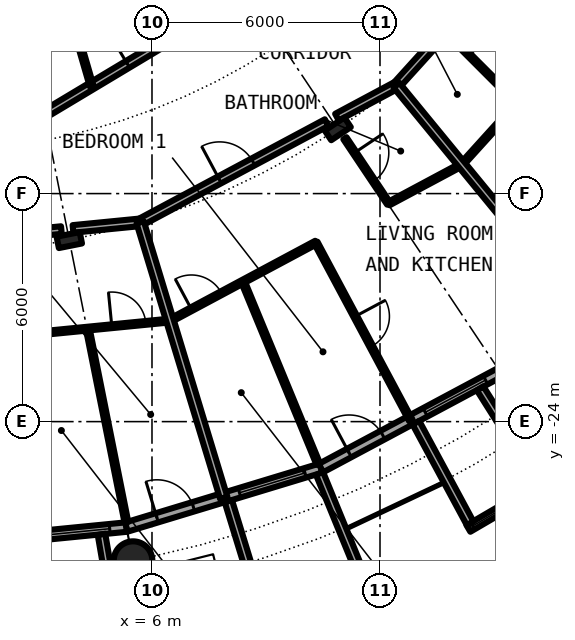
"""IFC4 building model, lengths in metres.
Left out: names, types, materials, properties, quantities, classifications, styles, units other than length and angle.
Written with IfcOpenShell. Run it as: python <this file> out.ifc"""

import sys

from ifc_helpers import new_model, si_unit, direction, frame, frame_2d, origin, origin_2d, place, context, subcontext, project, spatial, rectangle, circle, hollow_circle, i_section, extrude, element, fill, save


model = new_model("IFC4")
c1 = context("Model", 3, precision=1e-05, world=origin(), true_north=direction((0.0, 1.0)))
c2 = subcontext(c1, "Body", "Model", "MODEL_VIEW")
j1 = project(units=[si_unit("LENGTHUNIT", "METRE"), si_unit("PLANEANGLEUNIT", "RADIAN")], contexts=[c1])
p1 = place(None, origin())
s1 = spatial("IfcSite", under=j1, at=p1, CompositionType="ELEMENT")
p2 = place(p1, origin())
s2 = spatial("IfcBuilding", under=s1, at=p2, CompositionType="ELEMENT")
p3 = place(p2, frame((0.0, 0.0, 50.25)))
s3 = spatial("IfcBuildingStorey", under=s2, at=p3, CompositionType="ELEMENT", Elevation=50.25)
p4 = place(p3, frame((5.501, -27.658, 0.0), z_axis=(0.0, 0.0, 1.0), x_axis=(1.0, 0.0, 0.0)))
e1 = element("IfcColumn", 1, at=p4, inside=s3, PredefinedType="COLUMN", context=c2, shape_type="SweptSolid", body=[
    extrude(hollow_circle(Radius=0.508, WallThickness=0.05, at=origin_2d()), origin(), (0.0, 0.0, 1.0), 3.05),
])
for number, where, z_axis, x_axis in (
    (2, (3.824, -19.223, 0.0), (0.0, 0.0, 1.0), (0.195, -0.981, 0.0)),
    (3, (10.889, -16.297, 0.0), (0.0, 0.0, 1.0), (0.556, -0.831, 0.0)),
):
    element("IfcColumn", number, at=place(p3, frame(where, z_axis=z_axis, x_axis=x_axis)), inside=s3, PredefinedType="COLUMN", context=c2, shape_type="SweptSolid", body=[
        extrude(i_section(OverallWidth=0.305, OverallDepth=0.62, WebThickness=0.021, FlangeThickness=0.04, FilletRadius=0.027, at=origin_2d()), origin(), (0.0, 0.0, 1.0), 3.05),
    ])
p5 = place(p3, frame((0.0, -27.3, 0.0), z_axis=(0.0, 0.0, 1.0), x_axis=(0.995173996315, 0.098126026407, 0.0)))
e4 = element("IfcWall", 4, at=p5, inside=s3, PredefinedType="SOLIDWALL", context=c2, shape_type="SweptSolid", body=[
    extrude(rectangle(XDim=5.352, YDim=0.25, at=frame_2d((2.676, 0.0))), origin(), (0.0, 0.0, 1.0), 2.7),
])
p6 = place(p5, frame((0.841, 0.0, 0.0)))
e5 = element("IfcOpeningElement", 5, at=p6, cuts=e4, PredefinedType="OPENING", context=c2, shape_type="SweptSolid", body=[
    extrude(rectangle(XDim=1.0, YDim=2.2, at=frame_2d((0.5, 1.1))), frame((0.0, 0.135, 0.0), z_axis=(0.0, -1.0, 0.0), x_axis=(1.0, 0.0, 0.0)), (0.0, 0.0, 1.0), 0.27),
])
p7 = place(p5, frame((3.111, 0.0, 0.3)))
e6 = element("IfcOpeningElement", 6, at=p7, cuts=e4, PredefinedType="OPENING", context=c2, shape_type="SweptSolid", body=[
    extrude(rectangle(XDim=1.8, YDim=2.1, at=frame_2d((0.9, 1.05))), frame((0.0, 0.135, 0.0), z_axis=(0.0, -1.0, 0.0), x_axis=(1.0, 0.0, 0.0)), (0.0, 0.0, 1.0), 0.27),
])
p8 = place(p3, frame((4.671, -26.966, -0.03), z_axis=(0.0, 0.0, 1.0), x_axis=(0.170539878907, -0.985350774954, 0.0)))
e7 = element("IfcWall", 7, at=p8, inside=s3, PredefinedType="SOLIDWALL", context=c2, shape_type="SweptSolid", body=[
    extrude(rectangle(XDim=2.932, YDim=0.2, at=frame_2d((1.466, 0.0))), origin(), (0.0, 0.0, 1.0), 2.73),
])
p9 = place(p3, frame((5.326, -26.775, 0.0), z_axis=(0.0, 0.0, 1.0), x_axis=(0.956965678721, 0.290201119486, 0.0)))
e8 = element("IfcWall", 8, at=p9, inside=s3, PredefinedType="SOLIDWALL", context=c2, shape_type="SweptSolid", body=[
    extrude(rectangle(XDim=5.351, YDim=0.25, at=frame_2d((2.676, 0.0))), origin(), (0.0, 0.0, 1.0), 2.7),
])
p10 = place(p9, frame((0.841, 0.0, 0.0)))
e9 = element("IfcOpeningElement", 9, at=p10, cuts=e8, PredefinedType="OPENING", context=c2, shape_type="SweptSolid", body=[
    extrude(rectangle(XDim=1.0, YDim=2.2, at=frame_2d((0.5, 1.1))), frame((0.0, 0.135, 0.0), z_axis=(0.0, -1.0, 0.0), x_axis=(1.0, 0.0, 0.0)), (0.0, 0.0, 1.0), 0.27),
])
p11 = place(p9, frame((3.111, 0.0, 0.3)))
e10 = element("IfcOpeningElement", 10, at=p11, cuts=e8, PredefinedType="OPENING", context=c2, shape_type="SweptSolid", body=[
    extrude(rectangle(XDim=1.8, YDim=2.1, at=frame_2d((0.9, 1.05))), frame((0.0, 0.135, 0.0), z_axis=(0.0, -1.0, 0.0), x_axis=(1.0, 0.0, 0.0)), (0.0, 0.0, 1.0), 0.27),
])
p12 = place(p3, frame((8.009, -26.092, -0.03), z_axis=(0.0, 0.0, 1.0), x_axis=(0.293406695073, -0.955987715029, 0.0)))
e11 = element("IfcWall", 11, at=p12, inside=s3, PredefinedType="SOLIDWALL", context=c2, shape_type="SweptSolid", body=[
    extrude(rectangle(XDim=3.006, YDim=0.2, at=frame_2d((1.503, 0.0))), origin(), (0.0, 0.0, 1.0), 2.73),
])
p13 = place(p3, frame((10.409, -25.364, -0.03), z_axis=(0.0, 0.0, 1.0), x_axis=(0.379509886562, -0.925187681501, 0.0)))
e12 = element("IfcWall", 12, at=p13, inside=s3, PredefinedType="SOLIDWALL", context=c2, shape_type="SweptSolid", body=[
    extrude(rectangle(XDim=2.883, YDim=0.2, at=frame_2d((1.441, 0.0))), origin(), (0.0, 0.0, 1.0), 2.73),
])
p14 = place(p3, frame((10.447, -25.222, 0.0), z_axis=(0.0, 0.0, 1.0), x_axis=(0.881915646801, 0.471407246368, 0.0)))
e13 = element("IfcWall", 13, at=p14, inside=s3, PredefinedType="SOLIDWALL", context=c2, shape_type="SweptSolid", body=[
    extrude(rectangle(XDim=5.352, YDim=0.25, at=frame_2d((2.676, 0.0))), origin(), (0.0, 0.0, 1.0), 2.7),
])
p15 = place(p14, frame((0.841, 0.0, 0.0)))
e14 = element("IfcOpeningElement", 14, at=p15, cuts=e13, PredefinedType="OPENING", context=c2, shape_type="SweptSolid", body=[
    extrude(rectangle(XDim=1.0, YDim=2.2, at=frame_2d((0.5, 1.1))), frame((0.0, 0.135, 0.0), z_axis=(0.0, -1.0, 0.0), x_axis=(1.0, 0.0, 0.0)), (0.0, 0.0, 1.0), 0.27),
])
p16 = place(p14, frame((3.111, 0.0, 0.3)))
e15 = element("IfcOpeningElement", 15, at=p16, cuts=e13, PredefinedType="OPENING", context=c2, shape_type="SweptSolid", body=[
    extrude(rectangle(XDim=1.8, YDim=2.1, at=frame_2d((0.9, 1.05))), frame((0.0, 0.135, 0.0), z_axis=(0.0, -1.0, 0.0), x_axis=(1.0, 0.0, 0.0)), (0.0, 0.0, 1.0), 0.27),
])
p17 = place(p3, frame((14.327, -26.812, -0.03), z_axis=(0.0, 0.0, 1.0), x_axis=(0.863346521872, 0.504611517081, 0.0)))
e16 = element("IfcWall", 16, at=p17, inside=s3, PredefinedType="SOLIDWALL", context=c2, shape_type="SweptSolid", body=[
    extrude(rectangle(XDim=2.336, YDim=0.2, at=frame_2d((1.168, 0.0))), origin(), (0.0, 0.0, 1.0), 2.73),
])
p18 = place(p17, frame((0.128, 0.0, 0.33)))
e17 = element("IfcOpeningElement", 17, at=p18, cuts=e16, PredefinedType="OPENING", context=c2, shape_type="SweptSolid", body=[
    extrude(circle(Radius=1.04, at=frame_2d((1.04, 1.04))), frame((0.0, 0.11, 0.0), z_axis=(0.0, -1.0, 0.0), x_axis=(1.0, 0.0, 0.0)), (0.0, 0.0, 1.0), 0.22),
])
p19 = place(p3, frame((12.945, -24.029, -0.03), z_axis=(0.0, 0.0, 1.0), x_axis=(0.474424310775, -0.88029629861, 0.0)))
e18 = element("IfcWall", 18, at=p19, inside=s3, PredefinedType="SOLIDWALL", context=c2, shape_type="SweptSolid", body=[
    extrude(rectangle(XDim=3.006, YDim=0.2, at=frame_2d((1.503, 0.0))), origin(), (0.0, 0.0, 1.0), 2.73),
])
p20 = place(p3, frame((14.635, -23.126, -0.03), z_axis=(0.0, 0.0, 1.0), x_axis=(0.534437802731, -0.845207805816, 0.0)))
e19 = element("IfcWall", 19, at=p20, inside=s3, PredefinedType="SOLIDWALL", context=c2, shape_type="SweptSolid", body=[
    extrude(rectangle(XDim=2.932, YDim=0.2, at=frame_2d((1.466, 0.0))), origin(), (0.0, 0.0, 1.0), 2.73),
])
p21 = place(p3, frame((14.153, -17.234, 0.0), z_axis=(0.0, 0.0, 1.0), x_axis=(0.671144831591, 0.741326254107, 0.0)))
e20 = element("IfcWall", 20, at=p21, inside=s3, PredefinedType="PARTITIONING", context=c2, shape_type="SweptSolid", body=[
    extrude(rectangle(XDim=2.181, YDim=0.1, at=frame_2d((1.091, 0.0))), origin(), (0.0, 0.0, 1.0), 2.7),
])
p22 = place(p3, frame((2.144, -21.766, 0.0), z_axis=(0.0, 0.0, 1.0), x_axis=(0.995192120883, 0.097942036599, 0.0)))
e21 = element("IfcWall", 21, at=p22, inside=s3, PredefinedType="PARTITIONING", context=c2, shape_type="SweptSolid", body=[
    extrude(rectangle(XDim=4.35, YDim=0.1, at=frame_2d((2.175, 0.0))), origin(), (0.0, 0.0, 1.0), 2.7),
])
p23 = place(p22, frame((2.812, 0.0, 0.0)))
e22 = element("IfcOpeningElement", 22, at=p23, cuts=e21, PredefinedType="OPENING", context=c2, shape_type="SweptSolid", body=[
    extrude(rectangle(XDim=0.9, YDim=2.3, at=frame_2d((0.45, 1.15))), frame((0.0, 0.06, 0.0), z_axis=(0.0, -1.0, 0.0), x_axis=(1.0, 0.0, 0.0)), (0.0, 0.0, 1.0), 0.12),
])
p24 = place(p3, frame((6.478, -21.34, 0.0), z_axis=(0.0, 0.0, 1.0), x_axis=(0.881765663848, 0.471687729392, 0.0)))
e23 = element("IfcWall", 23, at=p24, inside=s3, PredefinedType="PARTITIONING", context=c2, shape_type="SweptSolid", body=[
    extrude(rectangle(XDim=4.355, YDim=0.1, at=frame_2d((2.177, 0.0))), origin(), (0.0, 0.0, 1.0), 2.7),
])
p25 = place(p24, frame((0.633, 0.0, 0.0)))
e24 = element("IfcOpeningElement", 24, at=p25, cuts=e23, PredefinedType="OPENING", context=c2, shape_type="SweptSolid", body=[
    extrude(rectangle(XDim=0.9, YDim=2.3, at=frame_2d((0.45, 1.15))), frame((0.0, 0.06, 0.0), z_axis=(0.0, -1.0, 0.0), x_axis=(1.0, 0.0, 0.0)), (0.0, 0.0, 1.0), 0.12),
])
p26 = place(p3, frame((12.229, -18.264, 0.0), z_axis=(0.0, 0.0, 1.0), x_axis=(0.881786813167, 0.471648191055, 0.0)))
e25 = element("IfcWall", 25, at=p26, inside=s3, PredefinedType="PARTITIONING", context=c2, shape_type="SweptSolid", body=[
    extrude(rectangle(XDim=2.175, YDim=0.1, at=frame_2d((1.087, 0.0))), origin(), (0.0, 0.0, 1.0), 2.7),
])
p27 = place(p3, frame((12.434, -15.151, 0.0), z_axis=(0.0, 0.0, 1.0), x_axis=(0.671514934772, 0.740991020444, 0.0)))
e26 = element("IfcWall", 26, at=p27, inside=s3, PredefinedType="PARTITIONING", context=c2, shape_type="SweptSolid", body=[
    extrude(rectangle(XDim=5.598, YDim=0.2, at=frame_2d((2.799, 0.0))), origin(), (0.0, 0.0, 1.0), 2.38),
])
p28 = place(p27, frame((3.305, 0.0, 0.0)))
e27 = element("IfcOpeningElement", 27, at=p28, cuts=e26, PredefinedType="OPENING", context=c2, shape_type="SweptSolid", body=[
    extrude(rectangle(XDim=1.0, YDim=2.3, at=frame_2d((0.5, 1.15))), frame((0.0, 0.11, 0.0), z_axis=(0.0, -1.0, 0.0), x_axis=(1.0, 0.0, 0.0)), (0.0, 0.0, 1.0), 0.22),
])
p29 = place(p3, frame((-1.927, -19.506, 0.0), z_axis=(0.0, 0.0, 1.0), x_axis=(0.995181086618, 0.098054091383, 0.0)))
e28 = element("IfcWall", 28, at=p29, inside=s3, PredefinedType="PARTITIONING", context=c2, shape_type="SweptSolid", body=[
    extrude(rectangle(XDim=5.57, YDim=0.2, at=frame_2d((2.785, 0.0))), origin(), (0.0, 0.0, 1.0), 2.38),
])
p30 = place(p29, frame((4.168, 0.0, 0.0)))
e29 = element("IfcOpeningElement", 29, at=p30, cuts=e28, PredefinedType="OPENING", context=c2, shape_type="SweptSolid", body=[
    extrude(rectangle(XDim=1.0, YDim=2.3, at=frame_2d((0.5, 1.15))), frame((0.0, 0.11, 0.0), z_axis=(0.0, -1.0, 0.0), x_axis=(1.0, 0.0, 0.0)), (0.0, 0.0, 1.0), 0.22),
])
p31 = place(p3, frame((3.921, -18.93, 0.0), z_axis=(0.0, 0.0, 1.0), x_axis=(0.995207057161, 0.097790149696, 0.0)))
e30 = element("IfcWall", 30, at=p31, inside=s3, PredefinedType="PARTITIONING", context=c2, shape_type="SweptSolid", body=[
    extrude(rectangle(XDim=1.778, YDim=0.2, at=frame_2d((0.889, 0.0))), origin(), (0.0, 0.0, 1.0), 2.38),
])
p32 = place(p3, frame((5.69, -18.756, 0.0), z_axis=(0.0, 0.0, 1.0), x_axis=(0.881866548297, 0.471499089072, 0.0)))
e31 = element("IfcWall", 31, at=p32, inside=s3, PredefinedType="PARTITIONING", context=c2, shape_type="SweptSolid", body=[
    extrude(rectangle(XDim=5.563, YDim=0.2, at=frame_2d((2.782, 0.0))), origin(), (0.0, 0.0, 1.0), 2.38),
])
p33 = place(p32, frame((2.368, 0.0, 0.0)))
e32 = element("IfcOpeningElement", 32, at=p33, cuts=e31, PredefinedType="OPENING", context=c2, shape_type="SweptSolid", body=[
    extrude(rectangle(XDim=1.0, YDim=2.3, at=frame_2d((0.5, 1.15))), frame((0.0, 0.11, 0.0), z_axis=(0.0, -1.0, 0.0), x_axis=(1.0, 0.0, 0.0)), (0.0, 0.0, 1.0), 0.22),
])
p34 = place(p3, frame((10.867, -15.989, 0.0), z_axis=(0.0, 0.0, 1.0), x_axis=(0.881596178172, 0.472004426496, 0.0)))
e33 = element("IfcWall", 33, at=p34, inside=s3, PredefinedType="PARTITIONING", context=c2, shape_type="SweptSolid", body=[
    extrude(rectangle(XDim=1.78, YDim=0.2, at=frame_2d((0.89, 0.0))), origin(), (0.0, 0.0, 1.0), 2.38),
])
p35 = place(p3, frame((1.656, -16.819, 0.0), z_axis=(0.0, 0.0, 1.0), x_axis=(0.857773470126, 0.514027892189, 0.0)))
e34 = element("IfcWall", 34, at=p35, inside=s3, PredefinedType="PARTITIONING", context=c2, shape_type="SweptSolid", body=[
    extrude(rectangle(XDim=14.429, YDim=0.2, at=frame_2d((7.215, 0.0))), origin(), (0.0, 0.0, 1.0), 2.7),
])
p36 = place(p35, frame((4.318, 0.0, 0.0)))
e35 = element("IfcOpeningElement", 35, at=p36, cuts=e34, PredefinedType="OPENING", context=c2, shape_type="SweptSolid", body=[
    extrude(rectangle(XDim=1.0, YDim=2.3, at=frame_2d((0.5, 1.15))), frame((0.0, 0.11, 0.0), z_axis=(0.0, -1.0, 0.0), x_axis=(1.0, 0.0, 0.0)), (0.0, 0.0, 1.0), 0.22),
])
p37 = place(p3, frame((3.706, -12.744, 0.0), z_axis=(0.0, 0.0, 1.0), x_axis=(0.279201466266, -0.960232545395, 0.0)))
e36 = element("IfcWall", 36, at=p37, inside=s3, PredefinedType="PARTITIONING", context=c2, shape_type="SweptSolid", body=[
    extrude(rectangle(XDim=2.524, YDim=0.1, at=frame_2d((1.262, 0.0))), origin(), (0.0, 0.0, 1.0), 2.7),
])
p38 = place(p3, frame((4.309, -21.553, 0.0), z_axis=(0.0, 0.0, 1.0), x_axis=(0.195899255693, -0.980624026638, 0.0)))
e37 = element("IfcWall", 37, at=p38, inside=s3, PredefinedType="PARTITIONING", context=c2, shape_type="SweptSolid", body=[
    extrude(rectangle(XDim=5.196, YDim=0.1, at=frame_2d((2.598, 0.0))), origin(), (0.0, 0.0, 1.0), 2.7),
])
p39 = place(p3, frame((5.689, -18.756, 0.0), z_axis=(0.0, 0.0, 1.0), x_axis=(0.290294523619, -0.956937348815, 0.0)))
e38 = element("IfcWall", 38, at=p39, inside=s3, PredefinedType="PARTITIONING", context=c2, shape_type="SweptSolid", body=[
    extrude(rectangle(XDim=7.575, YDim=0.2, at=frame_2d((3.788, 0.0))), origin(), (0.0, 0.0, 1.0), 2.7),
])
p40 = place(p3, frame((8.392, -20.314, 0.0), z_axis=(0.0, 0.0, 1.0), x_axis=(0.381673756215, -0.924297107978, 0.0)))
e39 = element("IfcWall", 39, at=p40, inside=s3, PredefinedType="PARTITIONING", context=c2, shape_type="SweptSolid", body=[
    extrude(rectangle(XDim=5.195, YDim=0.1, at=frame_2d((2.598, 0.0))), origin(), (0.0, 0.0, 1.0), 2.7),
])
p41 = place(p3, frame((10.31, -19.289, 0.0), z_axis=(0.0, 0.0, 1.0), x_axis=(0.47140999111, -0.881914179658, 0.0)))
e40 = element("IfcWall", 40, at=p41, inside=s3, PredefinedType="PARTITIONING", context=c2, shape_type="SweptSolid", body=[
    extrude(rectangle(XDim=5.303, YDim=0.1, at=frame_2d((2.652, 0.0))), origin(), (0.0, 0.0, 1.0), 2.7),
])
p42 = place(p41, frame((2.202, 0.0, 0.0)))
e41 = element("IfcOpeningElement", 41, at=p42, cuts=e40, PredefinedType="OPENING", context=c2, shape_type="SweptSolid", body=[
    extrude(rectangle(XDim=0.9, YDim=2.3, at=frame_2d((0.45, 1.15))), frame((0.0, 0.06, 0.0), z_axis=(0.0, -1.0, 0.0), x_axis=(1.0, 0.0, 0.0)), (0.0, 0.0, 1.0), 0.12),
])
p43 = place(p3, frame((11.077, -16.544, 0.0), z_axis=(0.0, 0.0, 1.0), x_axis=(0.556522278225, -0.830832687031, 0.0)))
e42 = element("IfcWall", 42, at=p43, inside=s3, PredefinedType="PARTITIONING", context=c2, shape_type="SweptSolid", body=[
    extrude(rectangle(XDim=2.07, YDim=0.1, at=frame_2d((1.035, 0.0))), origin(), (0.0, 0.0, 1.0), 2.7),
])
p44 = place(p43, frame((0.458, 0.0, 0.0)))
e43 = element("IfcOpeningElement", 43, at=p44, cuts=e42, PredefinedType="OPENING", context=c2, shape_type="SweptSolid", body=[
    extrude(rectangle(XDim=0.9, YDim=2.3, at=frame_2d((0.45, 1.15))), frame((0.0, 0.06, 0.0), z_axis=(0.0, -1.0, 0.0), x_axis=(1.0, 0.0, 0.0)), (0.0, 0.0, 1.0), 0.12),
])
p45 = place(p3, frame((12.434, -15.151, 0.0), z_axis=(0.0, 0.0, 1.0), x_axis=(0.634381303318, -0.773020285633, 0.0)))
e44 = element("IfcWall", 44, at=p45, inside=s3, PredefinedType="PARTITIONING", context=c2, shape_type="SweptSolid", body=[
    extrude(rectangle(XDim=7.576, YDim=0.2, at=frame_2d((3.788, 0.0))), origin(), (0.0, 0.0, 1.0), 2.7),
])
p46 = place(p3, frame((13.722, -13.73, 0.0), z_axis=(0.0, 0.0, 1.0), x_axis=(0.706741540154, -0.707471833659, 0.0)))
e45 = element("IfcWall", 45, at=p46, inside=s3, PredefinedType="PARTITIONING", context=c2, shape_type="SweptSolid", body=[
    extrude(rectangle(XDim=2.674, YDim=0.1, at=frame_2d((1.337, 0.0))), origin(), (0.0, 0.0, 1.0), 2.7),
])
p47 = place(p46, frame((0.887, 0.0, 0.0)))
e46 = element("IfcOpeningElement", 46, at=p47, cuts=e45, PredefinedType="OPENING", context=c2, shape_type="SweptSolid", body=[
    extrude(rectangle(XDim=0.9, YDim=2.3, at=frame_2d((0.45, 1.15))), frame((0.0, 0.06, 0.0), z_axis=(0.0, -1.0, 0.0), x_axis=(1.0, 0.0, 0.0)), (0.0, 0.0, 1.0), 0.12),
])
p48 = place(p7, origin())
e47 = element("IfcWindow", 47, at=p48, inside=s3, PartitioningType="SINGLE_PANEL", PredefinedType="WINDOW", context=c2, shape_type="SweptSolid", body=[
    extrude(rectangle(XDim=1.8, YDim=2.1, at=frame_2d((0.9, 1.05))), frame((0.0, 0.03, 0.0), z_axis=(0.0, -1.0, 0.0), x_axis=(1.0, 0.0, 0.0)), (0.0, 0.0, 1.0), 0.06),
])
fill(e6, e47)
p49 = place(p10, origin())
e48 = element("IfcDoor", 48, at=p49, inside=s3, OperationType="SINGLE_SWING_LEFT", PredefinedType="DOOR", context=c2, shape_type="SweptSolid", body=[
    extrude(rectangle(XDim=1.0, YDim=2.2, at=frame_2d((0.5, 1.1))), frame((0.0, 0.025, 0.0), z_axis=(0.0, -1.0, 0.0), x_axis=(1.0, 0.0, 0.0)), (0.0, 0.0, 1.0), 0.05),
])
fill(e9, e48)
p50 = place(p11, origin())
e49 = element("IfcWindow", 49, at=p50, inside=s3, PartitioningType="SINGLE_PANEL", PredefinedType="WINDOW", context=c2, shape_type="SweptSolid", body=[
    extrude(rectangle(XDim=1.8, YDim=2.1, at=frame_2d((0.9, 1.05))), frame((0.0, 0.03, 0.0), z_axis=(0.0, -1.0, 0.0), x_axis=(1.0, 0.0, 0.0)), (0.0, 0.0, 1.0), 0.06),
])
fill(e10, e49)
p51 = place(p15, origin())
e50 = element("IfcDoor", 50, at=p51, inside=s3, OperationType="SINGLE_SWING_LEFT", PredefinedType="DOOR", context=c2, shape_type="SweptSolid", body=[
    extrude(rectangle(XDim=1.0, YDim=2.2, at=frame_2d((0.5, 1.1))), frame((0.0, 0.025, 0.0), z_axis=(0.0, -1.0, 0.0), x_axis=(1.0, 0.0, 0.0)), (0.0, 0.0, 1.0), 0.05),
])
fill(e14, e50)
p52 = place(p16, origin())
e51 = element("IfcWindow", 51, at=p52, inside=s3, PartitioningType="SINGLE_PANEL", PredefinedType="WINDOW", context=c2, shape_type="SweptSolid", body=[
    extrude(rectangle(XDim=1.8, YDim=2.1, at=frame_2d((0.9, 1.05))), frame((0.0, 0.03, 0.0), z_axis=(0.0, -1.0, 0.0), x_axis=(1.0, 0.0, 0.0)), (0.0, 0.0, 1.0), 0.06),
])
fill(e15, e51)
p53 = place(p18, origin())
e52 = element("IfcWindow", 52, at=p53, inside=s3, PartitioningType="SINGLE_PANEL", PredefinedType="WINDOW", context=c2, shape_type="SweptSolid", body=[
    extrude(circle(Radius=1.04, at=frame_2d((1.04, 1.04))), frame((0.0, 0.03, 0.0), z_axis=(0.0, -1.0, 0.0), x_axis=(1.0, 0.0, 0.0)), (0.0, 0.0, 1.0), 0.06),
])
fill(e17, e52)
p54 = place(p23, origin())
e53 = element("IfcDoor", 53, at=p54, inside=s3, OperationType="SINGLE_SWING_RIGHT", PredefinedType="DOOR", context=c2, shape_type="SweptSolid", body=[
    extrude(rectangle(XDim=0.9, YDim=2.3, at=frame_2d((0.45, 1.15))), frame((0.0, 0.025, 0.0), z_axis=(0.0, -1.0, 0.0), x_axis=(1.0, 0.0, 0.0)), (0.0, 0.0, 1.0), 0.05),
])
fill(e22, e53)
p55 = place(p33, origin())
e54 = element("IfcDoor", 54, at=p55, inside=s3, OperationType="SINGLE_SWING_RIGHT", PredefinedType="DOOR", context=c2, shape_type="SweptSolid", body=[
    extrude(rectangle(XDim=1.0, YDim=2.3, at=frame_2d((0.5, 1.15))), frame((0.0, 0.025, 0.0), z_axis=(0.0, -1.0, 0.0), x_axis=(1.0, 0.0, 0.0)), (0.0, 0.0, 1.0), 0.05),
])
fill(e32, e54)
p56 = place(p44, origin())
e55 = element("IfcDoor", 55, at=p56, inside=s3, OperationType="SINGLE_SWING_LEFT", PredefinedType="DOOR", context=c2, shape_type="SweptSolid", body=[
    extrude(rectangle(XDim=0.9, YDim=2.3, at=frame_2d((0.45, 1.15))), frame((0.0, 0.025, 0.0), z_axis=(0.0, -1.0, 0.0), x_axis=(1.0, 0.0, 0.0)), (0.0, 0.0, 1.0), 0.05),
])
fill(e43, e55)
p57 = place(p42, origin())
e56 = element("IfcDoor", 56, at=p57, inside=s3, OperationType="SINGLE_SWING_RIGHT", PredefinedType="DOOR", context=c2, shape_type="SweptSolid", body=[
    extrude(rectangle(XDim=0.9, YDim=2.3, at=frame_2d((0.45, 1.15))), frame((0.0, 0.025, 0.0), z_axis=(0.0, -1.0, 0.0), x_axis=(1.0, 0.0, 0.0)), (0.0, 0.0, 1.0), 0.05),
])
fill(e41, e56)
p58 = place(p25, origin())
e57 = element("IfcDoor", 57, at=p58, inside=s3, OperationType="SINGLE_SWING_LEFT", PredefinedType="DOOR", context=c2, shape_type="SweptSolid", body=[
    extrude(rectangle(XDim=0.9, YDim=2.3, at=frame_2d((0.45, 1.15))), frame((0.0, 0.025, 0.0), z_axis=(0.0, -1.0, 0.0), x_axis=(1.0, 0.0, 0.0)), (0.0, 0.0, 1.0), 0.05),
])
fill(e24, e57)
p59 = place(p47, origin())
e58 = element("IfcDoor", 58, at=p59, inside=s3, OperationType="SINGLE_SWING_RIGHT", PredefinedType="DOOR", context=c2, shape_type="SweptSolid", body=[
    extrude(rectangle(XDim=0.9, YDim=2.3, at=frame_2d((0.45, 1.15))), frame((0.0, 0.025, 0.0), z_axis=(0.0, -1.0, 0.0), x_axis=(1.0, 0.0, 0.0)), (0.0, 0.0, 1.0), 0.05),
])
fill(e46, e58)
p60 = place(p36, origin())
e59 = element("IfcDoor", 59, at=p60, inside=s3, OperationType="SINGLE_SWING_LEFT", PredefinedType="DOOR", context=c2, shape_type="SweptSolid", body=[
    extrude(rectangle(XDim=1.0, YDim=2.3, at=frame_2d((0.5, 1.15))), frame((0.0, 0.025, 0.0), z_axis=(0.0, -1.0, 0.0), x_axis=(1.0, 0.0, 0.0)), (0.0, 0.0, 1.0), 0.05),
])
fill(e35, e59)
save(model, sys.argv[1])
